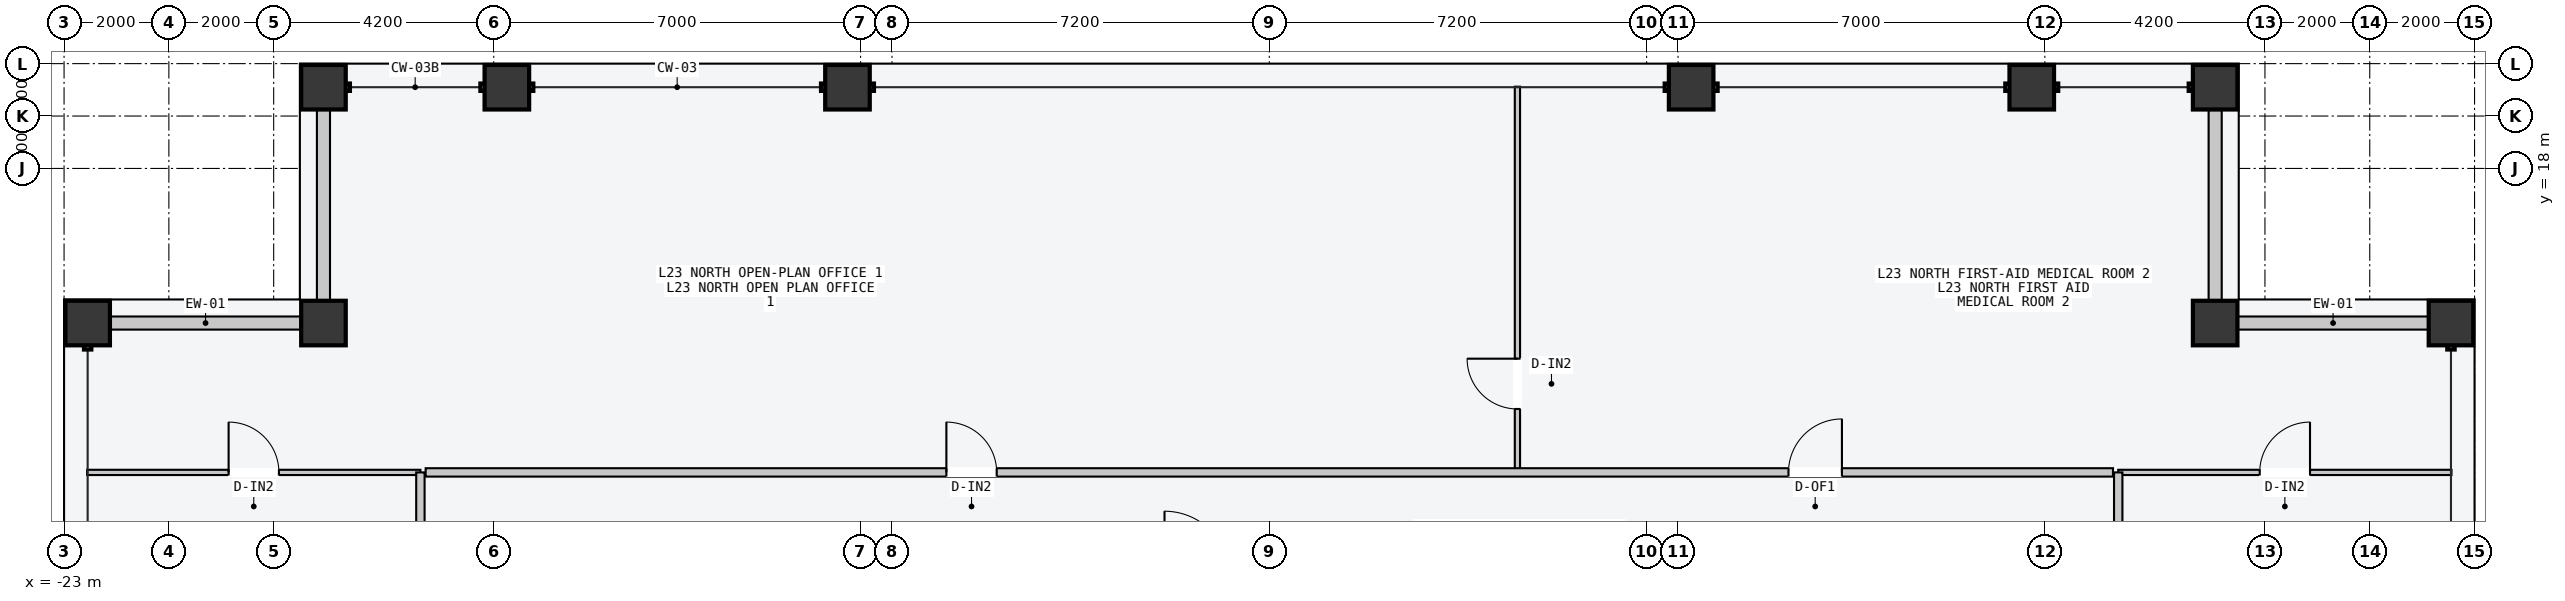
"""IFC4 building model, lengths in metres.
Left out: names, types, materials, properties, quantities, classifications, styles, units other than length and angle.
Written with IfcOpenShell. Run it as: python <this file> out.ifc"""

import sys

from ifc_helpers import new_model, si_unit, direction, frame, frame_2d, origin, origin_2d, place, context, subcontext, project, spatial, rectangle, hollow_rectangle, extrude, element, fill, save


model = new_model("IFC4")
c1 = context("Model", 3, precision=1e-05, world=origin(), true_north=direction((0.0, 1.0)))
c2 = subcontext(c1, "Body", "Model", "MODEL_VIEW")
j1 = project(units=[si_unit("LENGTHUNIT", "METRE"), si_unit("PLANEANGLEUNIT", "RADIAN")], contexts=[c1])
p1 = place(None, origin())
s1 = spatial("IfcSite", under=j1, at=p1, CompositionType="ELEMENT")
p2 = place(p1, origin())
s2 = spatial("IfcBuilding", under=s1, at=p2, CompositionType="ELEMENT")
p3 = place(p2, frame((0.0, 0.0, 91.8)))
s3 = spatial("IfcBuildingStorey", under=s2, at=p3, CompositionType="ELEMENT", Elevation=91.8)
for number, where, z_axis, x_axis in (
    (1, (-18.05, 19.55, 0.0), (0.0, 0.0, 1.0), (1.0, 0.0, 0.0)),
    (2, (-14.55, 19.55, 0.0), (0.0, 0.0, 1.0), (1.0, 0.0, 0.0)),
    (3, (-8.05, 19.55, 0.0), (0.0, 0.0, 1.0), (1.0, 0.0, 0.0)),
    (4, (8.05, 19.55, 0.0), (0.0, 0.0, 1.0), (1.0, 0.0, 0.0)),
    (5, (14.55, 19.55, 0.0), (0.0, 0.0, 1.0), (1.0, 0.0, 0.0)),
    (6, (18.05, 19.55, 0.0), (0.0, 0.0, 1.0), (1.0, 0.0, 0.0)),
    (7, (-22.55, 15.05, 0.0), (0.0, 0.0, 1.0), (0.0, 1.0, 0.0)),
    (8, (22.55, 15.05, 0.0), (0.0, 0.0, 1.0), (0.0, 1.0, 0.0)),
    (9, (-18.05, 15.05, 0.0), (0.0, 0.0, 1.0), (1.0, 0.0, 0.0)),
    (10, (18.05, 15.05, 0.0), (0.0, 0.0, 1.0), (1.0, 0.0, 0.0)),
):
    element("IfcColumn", number, at=place(p3, frame(where, z_axis=z_axis, x_axis=x_axis)), inside=s3, PredefinedType="COLUMN", context=c2, shape_type="SweptSolid", body=[
        extrude(hollow_rectangle(XDim=0.85, YDim=0.85, WallThickness=0.04, at=origin_2d()), origin(), (0.0, 0.0, 1.0), 3.6),
    ])
for number, where, z_axis, x_axis in (
    (11, (-22.115, 15.05, 0.0), (0.0, 0.0, 1.0), (1.0, 0.0, 0.0)),
    (12, (-18.05, 15.485, 0.0), (0.0, 0.0, 1.0), (0.0, 1.0, 0.0)),
    (13, (18.485, 15.05, 0.0), (0.0, 0.0, 1.0), (1.0, 0.0, 0.0)),
    (14, (18.05, 15.485, 0.0), (0.0, 0.0, 1.0), (0.0, 1.0, 0.0)),
):
    element("IfcWall", number, at=place(p3, frame(where, z_axis=z_axis, x_axis=x_axis)), inside=s3, PredefinedType="STANDARD", context=c2, shape_type="SweptSolid", body=[
        extrude(rectangle(XDim=3.63, YDim=0.25, at=frame_2d((1.815, 0.0))), origin(), (0.0, 0.0, 1.0), 2.7),
    ])
p4 = place(p3, frame((4.735, 12.26, 0.0), z_axis=(0.0, 0.0, 1.0), x_axis=(0.0, 1.0, 0.0)))
e15 = element("IfcWall", 15, at=p4, inside=s3, PredefinedType="PARTITIONING", context=c2, shape_type="SweptSolid", body=[
    extrude(rectangle(XDim=7.3, YDim=0.1, at=frame_2d((3.65, 0.0))), origin(), (0.0, 0.0, 1.0), 3.4),
])
p5 = place(p4, frame((1.15, 0.0, 0.0)))
e16 = element("IfcOpeningElement", 16, at=p5, cuts=e15, PredefinedType="OPENING", context=c2, shape_type="SweptSolid", body=[
    extrude(rectangle(XDim=0.96, YDim=2.18, at=frame_2d((0.48, 1.09))), frame((0.0, 0.06, 0.0), z_axis=(0.0, -1.0, 0.0), x_axis=(1.0, 0.0, 0.0)), (0.0, 0.0, 1.0), 0.12),
])
p6 = place(p3, frame((-16.1, 12.2, 0.0), z_axis=(0.0, 0.0, 1.0), x_axis=(1.0, 0.0, 0.0)))
e17 = element("IfcWall", 17, at=p6, inside=s3, PredefinedType="PARTITIONING", context=c2, shape_type="SweptSolid", body=[
    extrude(rectangle(XDim=32.2, YDim=0.16, at=frame_2d((16.1, 0.0))), origin(), (0.0, 0.0, 1.0), 3.4),
])
p7 = place(p6, frame((9.938, 0.0, 0.0)))
e18 = element("IfcOpeningElement", 18, at=p7, cuts=e17, PredefinedType="OPENING", context=c2, shape_type="SweptSolid", body=[
    extrude(rectangle(XDim=0.96, YDim=2.18, at=frame_2d((0.48, 1.09))), frame((0.0, 0.09, 0.0), z_axis=(0.0, -1.0, 0.0), x_axis=(1.0, 0.0, 0.0)), (0.0, 0.0, 1.0), 0.18),
])
p8 = place(p6, frame((26.007, 0.0, 0.0)))
e19 = element("IfcOpeningElement", 19, at=p8, cuts=e17, PredefinedType="OPENING", context=c2, shape_type="SweptSolid", body=[
    extrude(rectangle(XDim=1.02, YDim=2.2, at=frame_2d((0.51, 1.1))), frame((0.0, 0.09, 0.0), z_axis=(0.0, -1.0, 0.0), x_axis=(1.0, 0.0, 0.0)), (0.0, 0.0, 1.0), 0.18),
])
p9 = place(p3, frame((-22.56, 12.2, 0.0), z_axis=(0.0, 0.0, 1.0), x_axis=(1.0, 0.0, 0.0)))
e20 = element("IfcWall", 20, at=p9, inside=s3, PredefinedType="PARTITIONING", context=c2, shape_type="SweptSolid", body=[
    extrude(rectangle(XDim=6.36, YDim=0.1, at=frame_2d((3.18, 0.0))), origin(), (0.0, 0.0, 1.0), 3.4),
])
p10 = place(p9, frame((2.7, 0.0, 0.0)))
e21 = element("IfcOpeningElement", 21, at=p10, cuts=e20, PredefinedType="OPENING", context=c2, shape_type="SweptSolid", body=[
    extrude(rectangle(XDim=0.96, YDim=2.18, at=frame_2d((0.48, 1.09))), frame((0.0, 0.06, 0.0), z_axis=(0.0, -1.0, 0.0), x_axis=(1.0, 0.0, 0.0)), (0.0, 0.0, 1.0), 0.12),
])
p11 = place(p3, frame((16.2, 12.2, 0.0), z_axis=(0.0, 0.0, 1.0), x_axis=(1.0, 0.0, 0.0)))
e22 = element("IfcWall", 22, at=p11, inside=s3, PredefinedType="PARTITIONING", context=c2, shape_type="SweptSolid", body=[
    extrude(rectangle(XDim=6.36, YDim=0.1, at=frame_2d((3.18, 0.0))), origin(), (0.0, 0.0, 1.0), 3.4),
])
p12 = place(p11, frame((2.7, 0.0, 0.0)))
e23 = element("IfcOpeningElement", 23, at=p12, cuts=e22, PredefinedType="OPENING", context=c2, shape_type="SweptSolid", body=[
    extrude(rectangle(XDim=0.96, YDim=2.18, at=frame_2d((0.48, 1.09))), frame((0.0, 0.06, 0.0), z_axis=(0.0, -1.0, 0.0), x_axis=(1.0, 0.0, 0.0)), (0.0, 0.0, 1.0), 0.12),
])
for number, where, z_axis, x_axis in (
    (24, (-16.2, 10.25, 0.0), (0.0, 0.0, 1.0), (0.0, 1.0, 0.0)),
    (25, (16.2, 10.25, 0.0), (0.0, 0.0, 1.0), (0.0, 1.0, 0.0)),
):
    element("IfcWall", number, at=place(p3, frame(where, z_axis=z_axis, x_axis=x_axis)), inside=s3, PredefinedType="PARTITIONING", context=c2, shape_type="SweptSolid", body=[
        extrude(rectangle(XDim=1.95, YDim=0.16, at=frame_2d((0.975, 0.0))), origin(), (0.0, 0.0, 1.0), 3.4),
    ])
p13 = place(p5, origin())
e26 = element("IfcDoor", 26, at=p13, inside=s3, OperationType="SINGLE_SWING_RIGHT", PredefinedType="DOOR", context=c2, shape_type="SweptSolid", body=[
    extrude(rectangle(XDim=0.96, YDim=2.18, at=frame_2d((0.48, 1.09))), frame((0.0, 0.025, 0.0), z_axis=(0.0, -1.0, 0.0), x_axis=(1.0, 0.0, 0.0)), (0.0, 0.0, 1.0), 0.05),
])
fill(e16, e26)
p14 = place(p7, origin())
e27 = element("IfcDoor", 27, at=p14, inside=s3, OperationType="SINGLE_SWING_LEFT", PredefinedType="DOOR", context=c2, shape_type="SweptSolid", body=[
    extrude(rectangle(XDim=0.96, YDim=2.18, at=frame_2d((0.48, 1.09))), frame((0.0, 0.025, 0.0), z_axis=(0.0, -1.0, 0.0), x_axis=(1.0, 0.0, 0.0)), (0.0, 0.0, 1.0), 0.05),
])
fill(e18, e27)
p15 = place(p8, origin())
e28 = element("IfcDoor", 28, at=p15, inside=s3, OperationType="SINGLE_SWING_RIGHT", PredefinedType="DOOR", context=c2, shape_type="SweptSolid", body=[
    extrude(rectangle(XDim=1.02, YDim=2.2, at=frame_2d((0.51, 1.1))), frame((0.0, 0.025, 0.0), z_axis=(0.0, -1.0, 0.0), x_axis=(1.0, 0.0, 0.0)), (0.0, 0.0, 1.0), 0.05),
])
fill(e19, e28)
p16 = place(p10, origin())
e29 = element("IfcDoor", 29, at=p16, inside=s3, OperationType="SINGLE_SWING_LEFT", PredefinedType="DOOR", context=c2, shape_type="SweptSolid", body=[
    extrude(rectangle(XDim=0.96, YDim=2.18, at=frame_2d((0.48, 1.09))), frame((0.0, 0.025, 0.0), z_axis=(0.0, -1.0, 0.0), x_axis=(1.0, 0.0, 0.0)), (0.0, 0.0, 1.0), 0.05),
])
fill(e21, e29)
p17 = place(p12, origin())
e30 = element("IfcDoor", 30, at=p17, inside=s3, OperationType="SINGLE_SWING_RIGHT", PredefinedType="DOOR", context=c2, shape_type="SweptSolid", body=[
    extrude(rectangle(XDim=0.96, YDim=2.18, at=frame_2d((0.48, 1.09))), frame((0.0, 0.025, 0.0), z_axis=(0.0, -1.0, 0.0), x_axis=(1.0, 0.0, 0.0)), (0.0, 0.0, 1.0), 0.05),
])
fill(e23, e30)
save(model, sys.argv[1])
